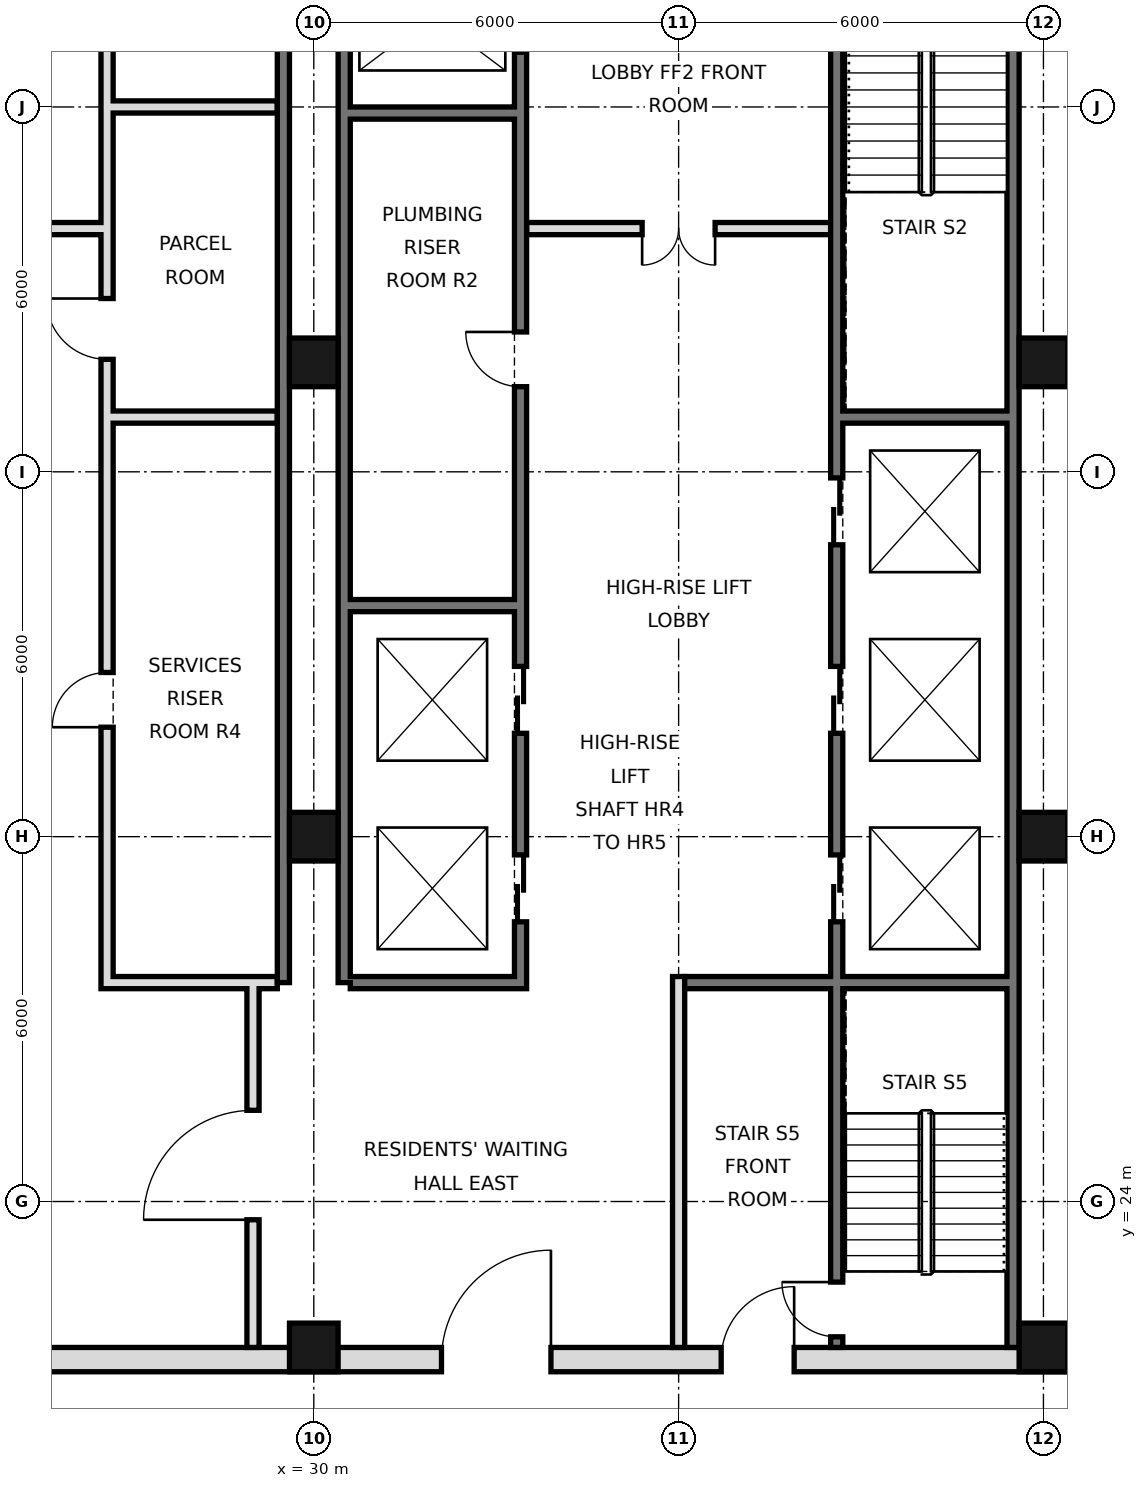
"""IFC4 building model, lengths in metres.
Left out: names, types, materials, properties, quantities, classifications, styles, units other than length and angle.
Written with IfcOpenShell. Run it as: python <this file> out.ifc"""

import sys

from ifc_helpers import new_model, si_unit, direction, frame, frame_2d, origin, origin_2d, place, context, subcontext, project, spatial, rectangle, hollow_rectangle, extrude, element, fill, save


model = new_model("IFC4")
c1 = context("Model", 3, precision=1e-05, world=origin(), true_north=direction((0.0, 1.0)))
c2 = subcontext(c1, "Body", "Model", "MODEL_VIEW")
j1 = project(units=[si_unit("LENGTHUNIT", "METRE"), si_unit("PLANEANGLEUNIT", "RADIAN")], contexts=[c1])
p1 = place(None, origin())
s1 = spatial("IfcSite", under=j1, at=p1, CompositionType="ELEMENT")
p2 = place(p1, origin())
s2 = spatial("IfcBuilding", under=s1, at=p2, CompositionType="ELEMENT")
p3 = place(p2, frame((0.0, 0.0, 308.8)))
s3 = spatial("IfcBuildingStorey", under=s2, at=p3, CompositionType="ELEMENT", Elevation=308.8)
for number, where, z_axis, x_axis in (
    (1, (30.0, 21.6, 0.0), (0.0, 0.0, 1.0), (1.0, 0.0, 0.0)),
    (2, (30.0, 30.0, 0.0), (0.0, 0.0, 1.0), (1.0, 0.0, 0.0)),
    (3, (30.0, 37.8, 0.0), (0.0, 0.0, 1.0), (1.0, 0.0, 0.0)),
    (4, (42.0, 21.6, 0.0), (0.0, 0.0, 1.0), (1.0, 0.0, 0.0)),
    (5, (42.0, 30.0, 0.0), (0.0, 0.0, 1.0), (1.0, 0.0, 0.0)),
    (6, (42.0, 37.8, 0.0), (0.0, 0.0, 1.0), (1.0, 0.0, 0.0)),
):
    element("IfcColumn", number, at=place(p3, frame(where, z_axis=z_axis, x_axis=x_axis)), inside=s3, PredefinedType="COLUMN", context=c2, shape_type="SweptSolid", body=[
        extrude(hollow_rectangle(XDim=0.8, YDim=0.8, WallThickness=0.025, at=origin_2d()), origin(), (0.0, 0.0, 1.0), 3.6),
    ])
p4 = place(p3, frame((41.5, 21.6, 0.0), z_axis=(0.0, 0.0, 1.0), x_axis=(0.0, 1.0, 0.0)))
e7 = element("IfcWall", 7, at=p4, inside=s3, PredefinedType="SOLIDWALL", context=c2, shape_type="SweptSolid", body=[
    extrude(rectangle(XDim=23.5, YDim=0.2, at=frame_2d((11.75, 0.0))), origin(), (0.0, 0.0, 1.0), 3.42),
])
for number, where, z_axis, x_axis in (
    (8, (29.5, 27.6, 0.0), (0.0, 0.0, 1.0), (0.0, 1.0, 0.0)),
    (9, (30.5, 27.6, 0.0), (0.0, 0.0, 1.0), (0.0, 1.0, 0.0)),
):
    element("IfcWall", number, at=place(p3, frame(where, z_axis=z_axis, x_axis=x_axis)), inside=s3, PredefinedType="SOLIDWALL", context=c2, shape_type="SweptSolid", body=[
        extrude(rectangle(XDim=17.5, YDim=0.2, at=frame_2d((8.75, 0.0))), origin(), (0.0, 0.0, 1.0), 3.42),
    ])
p5 = place(p3, frame((5.6, 21.4, 0.0), z_axis=(0.0, 0.0, 1.0), x_axis=(1.0, 0.0, 0.0)))
e10 = element("IfcWall", 10, at=p5, inside=s3, PredefinedType="SOLIDWALL", context=c2, shape_type="SweptSolid", body=[
    extrude(rectangle(XDim=36.8, YDim=0.4, at=frame_2d((18.4, 0.0))), origin(), (0.0, 0.0, 1.0), 3.42),
])
p6 = place(p5, frame((8.5, 0.0, 0.0)))
e11 = element("IfcOpeningElement", 11, at=p6, cuts=e10, PredefinedType="OPENING", context=c2, shape_type="SweptSolid", body=[
    extrude(rectangle(XDim=1.8, YDim=2.1, at=frame_2d((0.9, 1.05))), frame((0.0, 0.21, 0.0), z_axis=(0.0, -1.0, 0.0), x_axis=(1.0, 0.0, 0.0)), (0.0, 0.0, 1.0), 0.42),
])
p7 = place(p5, frame((17.5, 0.0, 0.0)))
e12 = element("IfcOpeningElement", 12, at=p7, cuts=e10, PredefinedType="OPENING", context=c2, shape_type="SweptSolid", body=[
    extrude(rectangle(XDim=1.8, YDim=2.1, at=frame_2d((0.9, 1.05))), frame((0.0, 0.21, 0.0), z_axis=(0.0, -1.0, 0.0), x_axis=(1.0, 0.0, 0.0)), (0.0, 0.0, 1.0), 0.42),
])
p8 = place(p5, frame((26.5, 0.0, 0.0)))
e13 = element("IfcOpeningElement", 13, at=p8, cuts=e10, PredefinedType="OPENING", context=c2, shape_type="SweptSolid", body=[
    extrude(rectangle(XDim=1.8, YDim=2.1, at=frame_2d((0.9, 1.05))), frame((0.0, 0.21, 0.0), z_axis=(0.0, -1.0, 0.0), x_axis=(1.0, 0.0, 0.0)), (0.0, 0.0, 1.0), 0.42),
])
p9 = place(p5, frame((4.5, 0.0, 0.0)))
e14 = element("IfcOpeningElement", 14, at=p9, cuts=e10, PredefinedType="OPENING", context=c2, shape_type="SweptSolid", body=[
    extrude(rectangle(XDim=1.2, YDim=2.1, at=frame_2d((0.6, 1.05))), frame((0.0, 0.21, 0.0), z_axis=(0.0, -1.0, 0.0), x_axis=(1.0, 0.0, 0.0)), (0.0, 0.0, 1.0), 0.42),
])
p10 = place(p5, frame((31.1, 0.0, 0.0)))
e15 = element("IfcOpeningElement", 15, at=p10, cuts=e10, PredefinedType="OPENING", context=c2, shape_type="SweptSolid", body=[
    extrude(rectangle(XDim=1.2, YDim=2.1, at=frame_2d((0.6, 1.05))), frame((0.0, 0.21, 0.0), z_axis=(0.0, -1.0, 0.0), x_axis=(1.0, 0.0, 0.0)), (0.0, 0.0, 1.0), 0.42),
])
p11 = place(p3, frame((29.0, 21.6, 0.0), z_axis=(0.0, 0.0, 1.0), x_axis=(0.0, 1.0, 0.0)))
e16 = element("IfcWall", 16, at=p11, inside=s3, PredefinedType="PARTITIONING", context=c2, shape_type="SweptSolid", body=[
    extrude(rectangle(XDim=6.0, YDim=0.2, at=frame_2d((3.0, 0.0))), origin(), (0.0, 0.0, 1.0), 3.42),
])
p12 = place(p11, frame((2.1, 0.0, 0.0)))
e17 = element("IfcOpeningElement", 17, at=p12, cuts=e16, PredefinedType="OPENING", context=c2, shape_type="SweptSolid", body=[
    extrude(rectangle(XDim=1.8, YDim=2.1, at=frame_2d((0.9, 1.05))), frame((0.0, 0.11, 0.0), z_axis=(0.0, -1.0, 0.0), x_axis=(1.0, 0.0, 0.0)), (0.0, 0.0, 1.0), 0.22),
])
p13 = place(p3, frame((26.6, 27.5, 0.0), z_axis=(0.0, 0.0, 1.0), x_axis=(0.0, 1.0, 0.0)))
e18 = element("IfcWall", 18, at=p13, inside=s3, PredefinedType="SOLIDWALL", context=c2, shape_type="SweptSolid", body=[
    extrude(rectangle(XDim=17.5, YDim=0.2, at=frame_2d((8.75, 0.0))), origin(), (0.0, 0.0, 1.0), 3.42),
])
p14 = place(p13, frame((4.3, 0.0, 0.0)))
e19 = element("IfcOpeningElement", 19, at=p14, cuts=e18, PredefinedType="OPENING", context=c2, shape_type="SweptSolid", body=[
    extrude(rectangle(XDim=0.9, YDim=2.1, at=frame_2d((0.45, 1.05))), frame((0.0, 0.11, 0.0), z_axis=(0.0, -1.0, 0.0), x_axis=(1.0, 0.0, 0.0)), (0.0, 0.0, 1.0), 0.22),
])
p15 = place(p13, frame((10.35, 0.0, 0.0)))
e20 = element("IfcOpeningElement", 20, at=p15, cuts=e18, PredefinedType="OPENING", context=c2, shape_type="SweptSolid", body=[
    extrude(rectangle(XDim=1.0, YDim=2.1, at=frame_2d((0.5, 1.05))), frame((0.0, 0.11, 0.0), z_axis=(0.0, -1.0, 0.0), x_axis=(1.0, 0.0, 0.0)), (0.0, 0.0, 1.0), 0.22),
])
p16 = place(p13, frame((15.475, 0.0, 0.0)))
e21 = element("IfcOpeningElement", 21, at=p16, cuts=e18, PredefinedType="OPENING", context=c2, shape_type="SweptSolid", body=[
    extrude(rectangle(XDim=1.0, YDim=2.1, at=frame_2d((0.5, 1.05))), frame((0.0, 0.11, 0.0), z_axis=(0.0, -1.0, 0.0), x_axis=(1.0, 0.0, 0.0)), (0.0, 0.0, 1.0), 0.22),
])
p17 = place(p3, frame((33.4, 27.5, 0.0), z_axis=(0.0, 0.0, 1.0), x_axis=(0.0, 1.0, 0.0)))
e22 = element("IfcWall", 22, at=p17, inside=s3, PredefinedType="SOLIDWALL", context=c2, shape_type="SweptSolid", body=[
    extrude(rectangle(XDim=17.5, YDim=0.2, at=frame_2d((8.75, 0.0))), origin(), (0.0, 0.0, 1.0), 3.42),
])
p18 = place(p17, frame((1.1, 0.0, 0.0)))
e23 = element("IfcOpeningElement", 23, at=p18, cuts=e22, PredefinedType="OPENING", context=c2, shape_type="SweptSolid", body=[
    extrude(rectangle(XDim=1.1, YDim=2.1, at=frame_2d((0.55, 1.05))), frame((0.0, 0.11, 0.0), z_axis=(0.0, -1.0, 0.0), x_axis=(1.0, 0.0, 0.0)), (0.0, 0.0, 1.0), 0.22),
])
p19 = place(p17, frame((4.2, 0.0, 0.0)))
e24 = element("IfcOpeningElement", 24, at=p19, cuts=e22, PredefinedType="OPENING", context=c2, shape_type="SweptSolid", body=[
    extrude(rectangle(XDim=1.1, YDim=2.1, at=frame_2d((0.55, 1.05))), frame((0.0, 0.11, 0.0), z_axis=(0.0, -1.0, 0.0), x_axis=(1.0, 0.0, 0.0)), (0.0, 0.0, 1.0), 0.22),
])
p20 = place(p17, frame((15.4, 0.0, 0.0)))
e25 = element("IfcOpeningElement", 25, at=p20, cuts=e22, PredefinedType="OPENING", context=c2, shape_type="SweptSolid", body=[
    extrude(rectangle(XDim=1.1, YDim=2.1, at=frame_2d((0.55, 1.05))), frame((0.0, 0.11, 0.0), z_axis=(0.0, -1.0, 0.0), x_axis=(1.0, 0.0, 0.0)), (0.0, 0.0, 1.0), 0.22),
])
p21 = place(p17, frame((9.9, 0.0, 0.0)))
e26 = element("IfcOpeningElement", 26, at=p21, cuts=e22, PredefinedType="OPENING", context=c2, shape_type="SweptSolid", body=[
    extrude(rectangle(XDim=0.9, YDim=2.1, at=frame_2d((0.45, 1.05))), frame((0.0, 0.11, 0.0), z_axis=(0.0, -1.0, 0.0), x_axis=(1.0, 0.0, 0.0)), (0.0, 0.0, 1.0), 0.22),
])
p22 = place(p3, frame((36.0, 21.6, 0.0), z_axis=(0.0, 0.0, 1.0), x_axis=(0.0, 1.0, 0.0)))
e27 = element("IfcWall", 27, at=p22, inside=s3, PredefinedType="PARTITIONING", context=c2, shape_type="SweptSolid", body=[
    extrude(rectangle(XDim=6.1, YDim=0.2, at=frame_2d((3.05, 0.0))), origin(), (0.0, 0.0, 1.0), 3.42),
])
p23 = place(p3, frame((38.6, 21.6, 0.0), z_axis=(0.0, 0.0, 1.0), x_axis=(0.0, 1.0, 0.0)))
e28 = element("IfcWall", 28, at=p23, inside=s3, PredefinedType="SOLIDWALL", context=c2, shape_type="SweptSolid", body=[
    extrude(rectangle(XDim=23.4, YDim=0.2, at=frame_2d((11.7, 0.0))), origin(), (0.0, 0.0, 1.0), 3.42),
])
p24 = place(p23, frame((7.0, 0.0, 0.0)))
e29 = element("IfcOpeningElement", 29, at=p24, cuts=e28, PredefinedType="OPENING", context=c2, shape_type="SweptSolid", body=[
    extrude(rectangle(XDim=1.1, YDim=2.1, at=frame_2d((0.55, 1.05))), frame((0.0, 0.11, 0.0), z_axis=(0.0, -1.0, 0.0), x_axis=(1.0, 0.0, 0.0)), (0.0, 0.0, 1.0), 0.22),
])
p25 = place(p23, frame((10.1, 0.0, 0.0)))
e30 = element("IfcOpeningElement", 30, at=p25, cuts=e28, PredefinedType="OPENING", context=c2, shape_type="SweptSolid", body=[
    extrude(rectangle(XDim=1.1, YDim=2.1, at=frame_2d((0.55, 1.05))), frame((0.0, 0.11, 0.0), z_axis=(0.0, -1.0, 0.0), x_axis=(1.0, 0.0, 0.0)), (0.0, 0.0, 1.0), 0.22),
])
p26 = place(p23, frame((13.2, 0.0, 0.0)))
e31 = element("IfcOpeningElement", 31, at=p26, cuts=e28, PredefinedType="OPENING", context=c2, shape_type="SweptSolid", body=[
    extrude(rectangle(XDim=1.1, YDim=2.1, at=frame_2d((0.55, 1.05))), frame((0.0, 0.11, 0.0), z_axis=(0.0, -1.0, 0.0), x_axis=(1.0, 0.0, 0.0)), (0.0, 0.0, 1.0), 0.22),
])
p27 = place(p23, frame((22.1, 0.0, 0.0)))
e32 = element("IfcOpeningElement", 32, at=p27, cuts=e28, PredefinedType="OPENING", context=c2, shape_type="SweptSolid", body=[
    extrude(rectangle(XDim=1.0, YDim=2.1, at=frame_2d((0.5, 1.05))), frame((0.0, 0.11, 0.0), z_axis=(0.0, -1.0, 0.0), x_axis=(1.0, 0.0, 0.0)), (0.0, 0.0, 1.0), 0.22),
])
p28 = place(p23, frame((0.175, 0.0, 0.0)))
e33 = element("IfcOpeningElement", 33, at=p28, cuts=e28, PredefinedType="OPENING", context=c2, shape_type="SweptSolid", body=[
    extrude(rectangle(XDim=0.9, YDim=2.1, at=frame_2d((0.45, 1.05))), frame((0.0, 0.11, 0.0), z_axis=(0.0, -1.0, 0.0), x_axis=(1.0, 0.0, 0.0)), (0.0, 0.0, 1.0), 0.22),
])
for number, where, z_axis, x_axis in (
    (34, (26.7, 27.6, 0.0), (0.0, 0.0, 1.0), (1.0, 0.0, 0.0)),
    (35, (30.6, 27.6, 0.0), (0.0, 0.0, 1.0), (1.0, 0.0, 0.0)),
):
    element("IfcWall", number, at=place(p3, frame(where, z_axis=z_axis, x_axis=x_axis)), inside=s3, PredefinedType="SOLIDWALL", context=c2, shape_type="SweptSolid", body=[
        extrude(rectangle(XDim=2.7, YDim=0.2, at=frame_2d((1.35, 0.0))), origin(), (0.0, 0.0, 1.0), 3.42),
    ])
p29 = place(p3, frame((36.1, 27.6, 0.0), z_axis=(0.0, 0.0, 1.0), x_axis=(1.0, 0.0, 0.0)))
e36 = element("IfcWall", 36, at=p29, inside=s3, PredefinedType="SOLIDWALL", context=c2, shape_type="SweptSolid", body=[
    extrude(rectangle(XDim=5.3, YDim=0.2, at=frame_2d((2.65, 0.0))), origin(), (0.0, 0.0, 1.0), 3.42),
])
for number, where, z_axis, x_axis in (
    (37, (30.6, 33.8, 0.0), (0.0, 0.0, 1.0), (1.0, 0.0, 0.0)),
    (38, (26.7, 36.9, 0.0), (0.0, 0.0, 1.0), (1.0, 0.0, 0.0)),
    (39, (38.7, 36.9, 0.0), (0.0, 0.0, 1.0), (1.0, 0.0, 0.0)),
):
    element("IfcWall", number, at=place(p3, frame(where, z_axis=z_axis, x_axis=x_axis)), inside=s3, PredefinedType="SOLIDWALL", context=c2, shape_type="SweptSolid", body=[
        extrude(rectangle(XDim=2.7, YDim=0.2, at=frame_2d((1.35, 0.0))), origin(), (0.0, 0.0, 1.0), 3.42),
    ])
p30 = place(p3, frame((21.5, 40.0, 0.0), z_axis=(0.0, 0.0, 1.0), x_axis=(1.0, 0.0, 0.0)))
e40 = element("IfcWall", 40, at=p30, inside=s3, PredefinedType="PARTITIONING", context=c2, shape_type="SweptSolid", body=[
    extrude(rectangle(XDim=5.0, YDim=0.2, at=frame_2d((2.5, 0.0))), origin(), (0.0, 0.0, 1.0), 3.42),
])
p31 = place(p30, frame((1.9, 0.0, 0.0)))
e41 = element("IfcOpeningElement", 41, at=p31, cuts=e40, PredefinedType="OPENING", context=c2, shape_type="SweptSolid", body=[
    extrude(rectangle(XDim=1.2, YDim=2.1, at=frame_2d((0.6, 1.05))), frame((0.0, 0.11, 0.0), z_axis=(0.0, -1.0, 0.0), x_axis=(1.0, 0.0, 0.0)), (0.0, 0.0, 1.0), 0.22),
])
p32 = place(p3, frame((33.5, 40.0, 0.0), z_axis=(0.0, 0.0, 1.0), x_axis=(1.0, 0.0, 0.0)))
e42 = element("IfcWall", 42, at=p32, inside=s3, PredefinedType="PARTITIONING", context=c2, shape_type="SweptSolid", body=[
    extrude(rectangle(XDim=5.0, YDim=0.2, at=frame_2d((2.5, 0.0))), origin(), (0.0, 0.0, 1.0), 3.42),
])
p33 = place(p32, frame((1.9, 0.0, 0.0)))
e43 = element("IfcOpeningElement", 43, at=p33, cuts=e42, PredefinedType="OPENING", context=c2, shape_type="SweptSolid", body=[
    extrude(rectangle(XDim=1.2, YDim=2.1, at=frame_2d((0.6, 1.05))), frame((0.0, 0.11, 0.0), z_axis=(0.0, -1.0, 0.0), x_axis=(1.0, 0.0, 0.0)), (0.0, 0.0, 1.0), 0.22),
])
p34 = place(p3, frame((30.6, 41.9, 0.0), z_axis=(0.0, 0.0, 1.0), x_axis=(1.0, 0.0, 0.0)))
e44 = element("IfcWall", 44, at=p34, inside=s3, PredefinedType="SOLIDWALL", context=c2, shape_type="SweptSolid", body=[
    extrude(rectangle(XDim=2.7, YDim=0.2, at=frame_2d((1.35, 0.0))), origin(), (0.0, 0.0, 1.0), 3.42),
])
p35 = place(p3, frame((26.7, 42.0, 0.0), z_axis=(0.0, 0.0, 1.0), x_axis=(1.0, 0.0, 0.0)))
e45 = element("IfcWall", 45, at=p35, inside=s3, PredefinedType="PARTITIONING", context=c2, shape_type="SweptSolid", body=[
    extrude(rectangle(XDim=2.7, YDim=0.2, at=frame_2d((1.35, 0.0))), origin(), (0.0, 0.0, 1.0), 3.42),
])
p36 = place(p12, origin())
e46 = element("IfcDoor", 46, at=p36, inside=s3, OperationType="SINGLE_SWING_LEFT", PredefinedType="DOOR", context=c2, shape_type="SweptSolid", body=[
    extrude(rectangle(XDim=1.8, YDim=2.1, at=frame_2d((0.9, 1.05))), frame((0.0, 0.025, 0.0), z_axis=(0.0, -1.0, 0.0), x_axis=(1.0, 0.0, 0.0)), (0.0, 0.0, 1.0), 0.05),
])
fill(e17, e46)
p37 = place(p8, frame((1.8, 0.0, 0.0), z_axis=(0.0, 0.0, 1.0), x_axis=(-1.0, 0.0, 0.0)))
e47 = element("IfcDoor", 47, at=p37, inside=s3, OperationType="SINGLE_SWING_LEFT", PredefinedType="DOOR", context=c2, shape_type="SweptSolid", body=[
    extrude(rectangle(XDim=1.8, YDim=2.1, at=frame_2d((0.9, 1.05))), frame((0.0, 0.025, 0.0), z_axis=(0.0, -1.0, 0.0), x_axis=(1.0, 0.0, 0.0)), (0.0, 0.0, 1.0), 0.05),
])
fill(e13, e47)
p38 = place(p10, frame((1.2, 0.0, 0.0), z_axis=(0.0, 0.0, 1.0), x_axis=(-1.0, 0.0, 0.0)))
e48 = element("IfcDoor", 48, at=p38, inside=s3, OperationType="SINGLE_SWING_LEFT", PredefinedType="DOOR", context=c2, shape_type="SweptSolid", body=[
    extrude(rectangle(XDim=1.2, YDim=2.1, at=frame_2d((0.6, 1.05))), frame((0.0, 0.025, 0.0), z_axis=(0.0, -1.0, 0.0), x_axis=(1.0, 0.0, 0.0)), (0.0, 0.0, 1.0), 0.05),
])
fill(e15, e48)
p39 = place(p33, frame((1.2, 0.0, 0.0), z_axis=(0.0, 0.0, 1.0), x_axis=(-1.0, 0.0, 0.0)))
e49 = element("IfcDoor", 49, at=p39, inside=s3, OperationType="DOUBLE_DOOR_SINGLE_SWING", PredefinedType="DOOR", context=c2, shape_type="SweptSolid", body=[
    extrude(rectangle(XDim=1.2, YDim=2.1, at=frame_2d((0.6, 1.05))), frame((0.0, 0.025, 0.0), z_axis=(0.0, -1.0, 0.0), x_axis=(1.0, 0.0, 0.0)), (0.0, 0.0, 1.0), 0.05),
])
fill(e43, e49)
p40 = place(p24, origin())
e50 = element("IfcDoor", 50, at=p40, inside=s3, OperationType="DOUBLE_DOOR_SLIDING", PredefinedType="DOOR", context=c2, shape_type="SweptSolid", body=[
    extrude(rectangle(XDim=1.1, YDim=2.1, at=frame_2d((0.55, 1.05))), frame((0.0, 0.025, 0.0), z_axis=(0.0, -1.0, 0.0), x_axis=(1.0, 0.0, 0.0)), (0.0, 0.0, 1.0), 0.05),
])
fill(e29, e50)
p41 = place(p25, origin())
e51 = element("IfcDoor", 51, at=p41, inside=s3, OperationType="DOUBLE_DOOR_SLIDING", PredefinedType="DOOR", context=c2, shape_type="SweptSolid", body=[
    extrude(rectangle(XDim=1.1, YDim=2.1, at=frame_2d((0.55, 1.05))), frame((0.0, 0.025, 0.0), z_axis=(0.0, -1.0, 0.0), x_axis=(1.0, 0.0, 0.0)), (0.0, 0.0, 1.0), 0.05),
])
fill(e30, e51)
p42 = place(p26, origin())
e52 = element("IfcDoor", 52, at=p42, inside=s3, OperationType="DOUBLE_DOOR_SLIDING", PredefinedType="DOOR", context=c2, shape_type="SweptSolid", body=[
    extrude(rectangle(XDim=1.1, YDim=2.1, at=frame_2d((0.55, 1.05))), frame((0.0, 0.025, 0.0), z_axis=(0.0, -1.0, 0.0), x_axis=(1.0, 0.0, 0.0)), (0.0, 0.0, 1.0), 0.05),
])
fill(e31, e52)
p43 = place(p18, origin())
e53 = element("IfcDoor", 53, at=p43, inside=s3, OperationType="DOUBLE_DOOR_SLIDING", PredefinedType="DOOR", context=c2, shape_type="SweptSolid", body=[
    extrude(rectangle(XDim=1.1, YDim=2.1, at=frame_2d((0.55, 1.05))), frame((0.0, 0.025, 0.0), z_axis=(0.0, -1.0, 0.0), x_axis=(1.0, 0.0, 0.0)), (0.0, 0.0, 1.0), 0.05),
])
fill(e23, e53)
p44 = place(p19, origin())
e54 = element("IfcDoor", 54, at=p44, inside=s3, OperationType="DOUBLE_DOOR_SLIDING", PredefinedType="DOOR", context=c2, shape_type="SweptSolid", body=[
    extrude(rectangle(XDim=1.1, YDim=2.1, at=frame_2d((0.55, 1.05))), frame((0.0, 0.025, 0.0), z_axis=(0.0, -1.0, 0.0), x_axis=(1.0, 0.0, 0.0)), (0.0, 0.0, 1.0), 0.05),
])
fill(e24, e54)
p45 = place(p28, frame((0.9, 0.0, 0.0), z_axis=(0.0, 0.0, 1.0), x_axis=(-1.0, 0.0, 0.0)))
e55 = element("IfcDoor", 55, at=p45, inside=s3, OperationType="SINGLE_SWING_LEFT", PredefinedType="DOOR", context=c2, shape_type="SweptSolid", body=[
    extrude(rectangle(XDim=0.9, YDim=2.1, at=frame_2d((0.45, 1.05))), frame((0.0, 0.025, 0.0), z_axis=(0.0, -1.0, 0.0), x_axis=(1.0, 0.0, 0.0)), (0.0, 0.0, 1.0), 0.05),
])
fill(e33, e55)
p46 = place(p21, frame((0.9, 0.0, 0.0), z_axis=(0.0, 0.0, 1.0), x_axis=(-1.0, 0.0, 0.0)))
e56 = element("IfcDoor", 56, at=p46, inside=s3, OperationType="SINGLE_SWING_LEFT", PredefinedType="DOOR", context=c2, shape_type="SweptSolid", body=[
    extrude(rectangle(XDim=0.9, YDim=2.1, at=frame_2d((0.45, 1.05))), frame((0.0, 0.025, 0.0), z_axis=(0.0, -1.0, 0.0), x_axis=(1.0, 0.0, 0.0)), (0.0, 0.0, 1.0), 0.05),
])
fill(e26, e56)
p47 = place(p14, origin())
e57 = element("IfcDoor", 57, at=p47, inside=s3, OperationType="SINGLE_SWING_LEFT", PredefinedType="DOOR", context=c2, shape_type="SweptSolid", body=[
    extrude(rectangle(XDim=0.9, YDim=2.1, at=frame_2d((0.45, 1.05))), frame((0.0, 0.025, 0.0), z_axis=(0.0, -1.0, 0.0), x_axis=(1.0, 0.0, 0.0)), (0.0, 0.0, 1.0), 0.05),
])
fill(e19, e57)
p48 = place(p15, frame((1.0, 0.0, 0.0), z_axis=(0.0, 0.0, 1.0), x_axis=(-1.0, 0.0, 0.0)))
e58 = element("IfcDoor", 58, at=p48, inside=s3, OperationType="SINGLE_SWING_LEFT", PredefinedType="DOOR", context=c2, shape_type="SweptSolid", body=[
    extrude(rectangle(XDim=1.0, YDim=2.1, at=frame_2d((0.5, 1.05))), frame((0.0, 0.025, 0.0), z_axis=(0.0, -1.0, 0.0), x_axis=(1.0, 0.0, 0.0)), (0.0, 0.0, 1.0), 0.05),
])
fill(e20, e58)
save(model, sys.argv[1])
